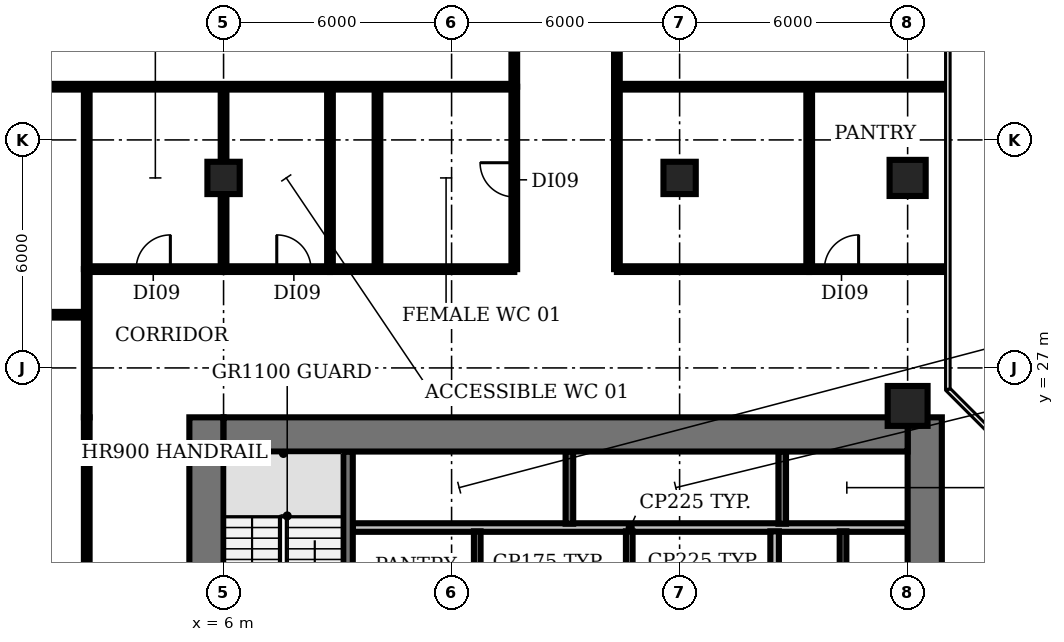
"""IFC4 building model, lengths in metres.
Left out: names, types, materials, properties, quantities, classifications, styles, units other than length and angle.
Written with IfcOpenShell. Run it as: python <this file> out.ifc"""

import sys

from ifc_helpers import new_model, si_unit, direction, frame, frame_2d, origin, origin_2d, place, context, subcontext, project, spatial, rectangle, circle, extrude, element, fill, save


model = new_model("IFC4")
c1 = context("Model", 3, precision=1e-05, world=origin(), true_north=direction((0.0, 1.0)))
c2 = subcontext(c1, "Body", "Model", "MODEL_VIEW")
j1 = project(units=[si_unit("LENGTHUNIT", "METRE"), si_unit("PLANEANGLEUNIT", "RADIAN")], contexts=[c1])
p1 = place(None, origin())
s1 = spatial("IfcSite", under=j1, at=p1, CompositionType="ELEMENT")
p2 = place(p1, origin())
s2 = spatial("IfcBuilding", under=s1, at=p2, CompositionType="ELEMENT")
p3 = place(p2, frame((0.0, 0.0, 58.4)))
s3 = spatial("IfcBuildingStorey", under=s2, at=p3, CompositionType="ELEMENT", Elevation=58.4)
for number, where, z_axis, x_axis in (
    (1, (6.0, 32.0, 0.0), (0.0, 0.0, 1.0), (1.0, 0.0, 0.0)),
    (2, (18.0, 32.0, 0.0), (0.0, 0.0, 1.0), (1.0, 0.0, 0.0)),
):
    element("IfcColumn", number, at=place(p3, frame(where, z_axis=z_axis, x_axis=x_axis)), inside=s3, PredefinedType="COLUMN", context=c2, shape_type="SweptSolid", body=[
        extrude(rectangle(XDim=0.85, YDim=0.85, at=origin_2d()), origin(), (0.0, 0.0, 1.0), 3.85),
    ])
p4 = place(p3, frame((24.0, 26.0, 0.0), z_axis=(0.0, 0.0, 1.0), x_axis=(1.0, 0.0, 0.0)))
e3 = element("IfcColumn", 3, at=p4, inside=s3, PredefinedType="COLUMN", context=c2, shape_type="SweptSolid", body=[
    extrude(circle(Radius=0.525, at=origin_2d()), origin(), (0.0, 0.0, 1.0), 3.85),
])
p5 = place(p3, frame((24.0, 32.0, 0.0), z_axis=(0.0, 0.0, 1.0), x_axis=(1.0, 0.0, 0.0)))
e4 = element("IfcColumn", 4, at=p5, inside=s3, PredefinedType="COLUMN", context=c2, shape_type="SweptSolid", body=[
    extrude(rectangle(XDim=0.95, YDim=0.95, at=origin_2d()), origin(), (0.0, 0.0, 1.0), 3.85),
])
p6 = place(p3, frame((9.4, 22.8, 0.0), z_axis=(0.0, 0.0, 1.0), x_axis=(1.0, 0.0, 0.0)))
e5 = element("IfcWall", 5, at=p6, inside=s3, PredefinedType="PARTITIONING", context=c2, shape_type="SweptSolid", body=[
    extrude(rectangle(XDim=14.6, YDim=0.225, at=frame_2d((7.3, 0.0))), origin(), (0.0, 0.0, 1.0), 3.85),
])
p7 = place(p3, frame((9.275, 18.375, 0.0), z_axis=(0.0, 0.0, 1.0), x_axis=(0.0, 1.0, 0.0)))
e6 = element("IfcWall", 6, at=p7, inside=s3, PredefinedType="SHEAR", context=c2, shape_type="SweptSolid", body=[
    extrude(rectangle(XDim=6.425, YDim=0.25, at=frame_2d((3.212, 0.0))), origin(), (0.0, 0.0, 1.0), 3.85),
])
p8 = place(p3, frame((12.675, 20.1, 0.0), z_axis=(0.0, 0.0, 1.0), x_axis=(0.0, 1.0, 0.0)))
e7 = element("IfcWall", 7, at=p8, inside=s3, PredefinedType="PARTITIONING", context=c2, shape_type="SweptSolid", body=[
    extrude(rectangle(XDim=2.6, YDim=0.175, at=frame_2d((1.3, 0.0))), origin(), (0.0, 0.0, 1.0), 3.85),
])
p9 = place(p3, frame((15.1, 22.9, 0.0), z_axis=(0.0, 0.0, 1.0), x_axis=(0.0, 1.0, 0.0)))
e8 = element("IfcWall", 8, at=p9, inside=s3, PredefinedType="SHEAR", context=c2, shape_type="SweptSolid", body=[
    extrude(rectangle(XDim=1.9, YDim=0.2, at=frame_2d((0.95, 0.0))), origin(), (0.0, 0.0, 1.0), 3.85),
])
p10 = place(p3, frame((16.675, 20.1, 0.0), z_axis=(0.0, 0.0, 1.0), x_axis=(0.0, 1.0, 0.0)))
e9 = element("IfcWall", 9, at=p10, inside=s3, PredefinedType="PARTITIONING", context=c2, shape_type="SweptSolid", body=[
    extrude(rectangle(XDim=2.6, YDim=0.175, at=frame_2d((1.3, 0.0))), origin(), (0.0, 0.0, 1.0), 3.85),
])
p11 = place(p3, frame((20.5, 20.1, 0.0), z_axis=(0.0, 0.0, 1.0), x_axis=(0.0, 1.0, 0.0)))
e10 = element("IfcWall", 10, at=p11, inside=s3, PredefinedType="PARTITIONING", context=c2, shape_type="SweptSolid", body=[
    extrude(rectangle(XDim=2.6, YDim=0.225, at=frame_2d((1.3, 0.0))), origin(), (0.0, 0.0, 1.0), 3.85),
])
p12 = place(p3, frame((20.7, 22.9, 0.0), z_axis=(0.0, 0.0, 1.0), x_axis=(0.0, 1.0, 0.0)))
e11 = element("IfcWall", 11, at=p12, inside=s3, PredefinedType="SHEAR", context=c2, shape_type="SweptSolid", body=[
    extrude(rectangle(XDim=1.9, YDim=0.2, at=frame_2d((0.95, 0.0))), origin(), (0.0, 0.0, 1.0), 3.85),
])
p13 = place(p3, frame((22.3, 20.1, 0.0), z_axis=(0.0, 0.0, 1.0), x_axis=(0.0, 1.0, 0.0)))
e12 = element("IfcWall", 12, at=p13, inside=s3, PredefinedType="PARTITIONING", context=c2, shape_type="SweptSolid", body=[
    extrude(rectangle(XDim=2.6, YDim=0.175, at=frame_2d((1.3, 0.0))), origin(), (0.0, 0.0, 1.0), 3.85),
])
p14 = place(p3, frame((5.55, 4.5, 0.0), z_axis=(0.0, 0.0, 1.0), x_axis=(0.0, 1.0, 0.0)))
e13 = element("IfcWall", 13, at=p14, inside=s3, PredefinedType="SHEAR", context=c2, shape_type="SweptSolid", body=[
    extrude(rectangle(XDim=21.2, YDim=0.9, at=frame_2d((10.6, 0.0))), origin(), (0.0, 0.0, 1.0), 3.85),
])
p15 = place(p14, frame((1.15, 0.0, 0.0)))
e14 = element("IfcOpeningElement", 14, at=p15, cuts=e13, PredefinedType="OPENING", context=c2, shape_type="SweptSolid", body=[
    extrude(rectangle(XDim=1.5, YDim=2.1, at=frame_2d((0.75, 1.05))), frame((0.0, 0.46, 0.0), z_axis=(0.0, -1.0, 0.0), x_axis=(1.0, 0.0, 0.0)), (0.0, 0.0, 1.0), 0.92),
])
p16 = place(p14, frame((7.6, 0.0, 0.0)))
e15 = element("IfcOpeningElement", 15, at=p16, cuts=e13, PredefinedType="OPENING", context=c2, shape_type="SweptSolid", body=[
    extrude(rectangle(XDim=1.2, YDim=2.1, at=frame_2d((0.6, 1.05))), frame((0.0, 0.46, 0.0), z_axis=(0.0, -1.0, 0.0), x_axis=(1.0, 0.0, 0.0)), (0.0, 0.0, 1.0), 0.92),
])
p17 = place(p14, frame((14.15, 0.0, 0.0)))
e16 = element("IfcOpeningElement", 16, at=p17, cuts=e13, PredefinedType="OPENING", context=c2, shape_type="SweptSolid", body=[
    extrude(rectangle(XDim=1.2, YDim=2.1, at=frame_2d((0.6, 1.05))), frame((0.0, 0.46, 0.0), z_axis=(0.0, -1.0, 0.0), x_axis=(1.0, 0.0, 0.0)), (0.0, 0.0, 1.0), 0.92),
])
p18 = place(p3, frame((24.45, 25.7, 0.0), z_axis=(0.0, 0.0, 1.0), x_axis=(0.0, -1.0, 0.0)))
e17 = element("IfcWall", 17, at=p18, inside=s3, PredefinedType="SHEAR", context=c2, shape_type="SweptSolid", body=[
    extrude(rectangle(XDim=21.2, YDim=0.9, at=frame_2d((10.6, 0.0))), origin(), (0.0, 0.0, 1.0), 3.85),
])
p19 = place(p18, frame((18.55, 0.0, 0.0)))
e18 = element("IfcOpeningElement", 18, at=p19, cuts=e17, PredefinedType="OPENING", context=c2, shape_type="SweptSolid", body=[
    extrude(rectangle(XDim=1.5, YDim=2.1, at=frame_2d((0.75, 1.05))), frame((0.0, 0.46, 0.0), z_axis=(0.0, -1.0, 0.0), x_axis=(1.0, 0.0, 0.0)), (0.0, 0.0, 1.0), 0.92),
])
p20 = place(p18, frame((12.45, 0.0, 0.0)))
e19 = element("IfcOpeningElement", 19, at=p20, cuts=e17, PredefinedType="OPENING", context=c2, shape_type="SweptSolid", body=[
    extrude(rectangle(XDim=0.9, YDim=2.1, at=frame_2d((0.45, 1.05))), frame((0.0, 0.46, 0.0), z_axis=(0.0, -1.0, 0.0), x_axis=(1.0, 0.0, 0.0)), (0.0, 0.0, 1.0), 0.92),
])
p21 = place(p18, frame((6.45, 0.0, 0.0)))
e20 = element("IfcOpeningElement", 20, at=p21, cuts=e17, PredefinedType="OPENING", context=c2, shape_type="SweptSolid", body=[
    extrude(rectangle(XDim=2.0, YDim=2.1, at=frame_2d((1.0, 1.05))), frame((0.0, 0.46, 0.0), z_axis=(0.0, -1.0, 0.0), x_axis=(1.0, 0.0, 0.0)), (0.0, 0.0, 1.0), 0.92),
])
p22 = place(p3, frame((6.0, 25.25, 0.0), z_axis=(0.0, 0.0, 1.0), x_axis=(1.0, 0.0, 0.0)))
e21 = element("IfcWall", 21, at=p22, inside=s3, PredefinedType="SHEAR", context=c2, shape_type="SweptSolid", body=[
    extrude(rectangle(XDim=18.0, YDim=0.9, at=frame_2d((9.0, 0.0))), origin(), (0.0, 0.0, 1.0), 3.85),
])
p23 = place(p3, frame((-1.28, 34.4, 0.0), z_axis=(0.0, 0.0, 1.0), x_axis=(1.0, 0.0, 0.0)))
e22 = element("IfcWall", 22, at=p23, inside=s3, PredefinedType="PARTITIONING", context=c2, shape_type="SweptSolid", body=[
    extrude(rectangle(XDim=14.93, YDim=0.15, at=frame_2d((7.465, 0.0))), origin(), (0.0, 0.0, 1.0), 2.83),
])
p24 = place(p3, frame((-0.998, 28.4, 0.0), z_axis=(0.0, 0.0, 1.0), x_axis=(1.0, 0.0, 0.0)))
e23 = element("IfcWall", 23, at=p24, inside=s3, PredefinedType="PARTITIONING", context=c2, shape_type="SweptSolid", body=[
    extrude(rectangle(XDim=3.398, YDim=0.15, at=frame_2d((1.699, 0.0))), origin(), (0.0, 0.0, 1.0), 2.83),
])
p25 = place(p3, frame((2.4, 4.5, 0.0), z_axis=(0.0, 0.0, 1.0), x_axis=(0.0, 1.0, 0.0)))
e24 = element("IfcWall", 24, at=p25, inside=s3, PredefinedType="PARTITIONING", context=c2, shape_type="SweptSolid", body=[
    extrude(rectangle(XDim=21.2, YDim=0.15, at=frame_2d((10.6, 0.0))), origin(), (0.0, 0.0, 1.0), 2.83),
])
p26 = place(p25, frame((10.8, 0.0, 0.0)))
e25 = element("IfcOpeningElement", 25, at=p26, cuts=e24, PredefinedType="OPENING", context=c2, shape_type="SweptSolid", body=[
    extrude(rectangle(XDim=1.2, YDim=2.1, at=frame_2d((0.6, 1.05))), frame((0.0, 0.085, 0.0), z_axis=(0.0, -1.0, 0.0), x_axis=(1.0, 0.0, 0.0)), (0.0, 0.0, 1.0), 0.17),
])
p27 = place(p3, frame((2.4, 25.7, 0.0), z_axis=(0.0, 0.0, 1.0), x_axis=(0.0, 1.0, 0.0)))
e26 = element("IfcWall", 26, at=p27, inside=s3, PredefinedType="PARTITIONING", context=c2, shape_type="SweptSolid", body=[
    extrude(rectangle(XDim=3.9, YDim=0.15, at=frame_2d((1.95, 0.0))), origin(), (0.0, 0.0, 1.0), 2.83),
])
p28 = place(p3, frame((2.4, 29.6, 0.0), z_axis=(0.0, 0.0, 1.0), x_axis=(0.0, 1.0, 0.0)))
e27 = element("IfcWall", 27, at=p28, inside=s3, PredefinedType="PARTITIONING", context=c2, shape_type="SweptSolid", body=[
    extrude(rectangle(XDim=4.8, YDim=0.15, at=frame_2d((2.4, 0.0))), origin(), (0.0, 0.0, 1.0), 2.83),
])
p29 = place(p3, frame((2.4, 29.6, 0.0), z_axis=(0.0, 0.0, 1.0), x_axis=(1.0, 0.0, 0.0)))
e28 = element("IfcWall", 28, at=p29, inside=s3, PredefinedType="PARTITIONING", context=c2, shape_type="SweptSolid", body=[
    extrude(rectangle(XDim=3.6, YDim=0.15, at=frame_2d((1.8, 0.0))), origin(), (0.0, 0.0, 1.0), 2.83),
])
p30 = place(p29, frame((1.3, 0.0, 0.0)))
e29 = element("IfcOpeningElement", 29, at=p30, cuts=e28, PredefinedType="OPENING", context=c2, shape_type="SweptSolid", body=[
    extrude(rectangle(XDim=0.9, YDim=2.1, at=frame_2d((0.45, 1.05))), frame((0.0, 0.085, 0.0), z_axis=(0.0, -1.0, 0.0), x_axis=(1.0, 0.0, 0.0)), (0.0, 0.0, 1.0), 0.17),
])
p31 = place(p3, frame((6.0, 29.6, 0.0), z_axis=(0.0, 0.0, 1.0), x_axis=(0.0, 1.0, 0.0)))
e30 = element("IfcWall", 30, at=p31, inside=s3, PredefinedType="PARTITIONING", context=c2, shape_type="SweptSolid", body=[
    extrude(rectangle(XDim=4.8, YDim=0.15, at=frame_2d((2.4, 0.0))), origin(), (0.0, 0.0, 1.0), 2.83),
])
p32 = place(p3, frame((6.0, 29.6, 0.0), z_axis=(0.0, 0.0, 1.0), x_axis=(1.0, 0.0, 0.0)))
e31 = element("IfcWall", 31, at=p32, inside=s3, PredefinedType="PARTITIONING", context=c2, shape_type="SweptSolid", body=[
    extrude(rectangle(XDim=2.8, YDim=0.15, at=frame_2d((1.4, 0.0))), origin(), (0.0, 0.0, 1.0), 2.83),
])
p33 = place(p32, frame((1.4, 0.0, 0.0)))
e32 = element("IfcOpeningElement", 32, at=p33, cuts=e31, PredefinedType="OPENING", context=c2, shape_type="SweptSolid", body=[
    extrude(rectangle(XDim=0.9, YDim=2.1, at=frame_2d((0.45, 1.05))), frame((0.0, 0.085, 0.0), z_axis=(0.0, -1.0, 0.0), x_axis=(1.0, 0.0, 0.0)), (0.0, 0.0, 1.0), 0.17),
])
p34 = place(p3, frame((8.8, 29.6, 0.0), z_axis=(0.0, 0.0, 1.0), x_axis=(0.0, 1.0, 0.0)))
e33 = element("IfcWall", 33, at=p34, inside=s3, PredefinedType="PARTITIONING", context=c2, shape_type="SweptSolid", body=[
    extrude(rectangle(XDim=4.8, YDim=0.15, at=frame_2d((2.4, 0.0))), origin(), (0.0, 0.0, 1.0), 2.83),
])
p35 = place(p3, frame((8.8, 29.6, 0.0), z_axis=(0.0, 0.0, 1.0), x_axis=(1.0, 0.0, 0.0)))
e34 = element("IfcWall", 34, at=p35, inside=s3, PredefinedType="PARTITIONING", context=c2, shape_type="SweptSolid", body=[
    extrude(rectangle(XDim=4.85, YDim=0.15, at=frame_2d((2.425, 0.0))), origin(), (0.0, 0.0, 1.0), 2.83),
])
p36 = place(p3, frame((10.05, 29.6, 0.0), z_axis=(0.0, 0.0, 1.0), x_axis=(0.0, 1.0, 0.0)))
e35 = element("IfcWall", 35, at=p36, inside=s3, PredefinedType="PARTITIONING", context=c2, shape_type="SweptSolid", body=[
    extrude(rectangle(XDim=4.8, YDim=0.15, at=frame_2d((2.4, 0.0))), origin(), (0.0, 0.0, 1.0), 2.83),
])
p37 = place(p3, frame((13.65, 29.6, 0.0), z_axis=(0.0, 0.0, 1.0), x_axis=(0.0, 1.0, 0.0)))
e36 = element("IfcWall", 36, at=p37, inside=s3, PredefinedType="PARTITIONING", context=c2, shape_type="SweptSolid", body=[
    extrude(rectangle(XDim=4.8, YDim=0.15, at=frame_2d((2.4, 0.0))), origin(), (0.0, 0.0, 1.0), 2.83),
])
p38 = place(p37, frame((1.9, 0.0, 0.0)))
e37 = element("IfcOpeningElement", 37, at=p38, cuts=e36, PredefinedType="OPENING", context=c2, shape_type="SweptSolid", body=[
    extrude(rectangle(XDim=0.9, YDim=2.1, at=frame_2d((0.45, 1.05))), frame((0.0, 0.085, 0.0), z_axis=(0.0, -1.0, 0.0), x_axis=(1.0, 0.0, 0.0)), (0.0, 0.0, 1.0), 0.17),
])
p39 = place(p3, frame((13.65, 34.4, 0.0), z_axis=(0.0, 0.0, 1.0), x_axis=(0.0, 1.0, 0.0)))
e38 = element("IfcWall", 38, at=p39, inside=s3, PredefinedType="PARTITIONING", context=c2, shape_type="SweptSolid", body=[
    extrude(rectangle(XDim=4.6, YDim=0.15, at=frame_2d((2.3, 0.0))), origin(), (0.0, 0.0, 1.0), 2.83),
])
p40 = place(p39, frame((1.9, 0.0, 0.0)))
e39 = element("IfcOpeningElement", 39, at=p40, cuts=e38, PredefinedType="OPENING", context=c2, shape_type="SweptSolid", body=[
    extrude(rectangle(XDim=1.0, YDim=2.1, at=frame_2d((0.5, 1.05))), frame((0.0, 0.085, 0.0), z_axis=(0.0, -1.0, 0.0), x_axis=(1.0, 0.0, 0.0)), (0.0, 0.0, 1.0), 0.17),
])
p41 = place(p3, frame((16.35, 29.6, 0.0), z_axis=(0.0, 0.0, 1.0), x_axis=(0.0, 1.0, 0.0)))
e40 = element("IfcWall", 40, at=p41, inside=s3, PredefinedType="PARTITIONING", context=c2, shape_type="SweptSolid", body=[
    extrude(rectangle(XDim=4.8, YDim=0.15, at=frame_2d((2.4, 0.0))), origin(), (0.0, 0.0, 1.0), 2.83),
])
p42 = place(p3, frame((16.35, 29.6, 0.0), z_axis=(0.0, 0.0, 1.0), x_axis=(1.0, 0.0, 0.0)))
e41 = element("IfcWall", 41, at=p42, inside=s3, PredefinedType="PARTITIONING", context=c2, shape_type="SweptSolid", body=[
    extrude(rectangle(XDim=5.06, YDim=0.15, at=frame_2d((2.53, 0.0))), origin(), (0.0, 0.0, 1.0), 2.83),
])
p43 = place(p3, frame((16.35, 34.4, 0.0), z_axis=(0.0, 0.0, 1.0), x_axis=(1.0, 0.0, 0.0)))
e42 = element("IfcWall", 42, at=p43, inside=s3, PredefinedType="PARTITIONING", context=c2, shape_type="SweptSolid", body=[
    extrude(rectangle(XDim=8.66, YDim=0.15, at=frame_2d((4.33, 0.0))), origin(), (0.0, 0.0, 1.0), 2.83),
])
p44 = place(p3, frame((16.35, 45.0, 0.0), z_axis=(0.0, 0.0, 1.0), x_axis=(0.0, -1.0, 0.0)))
e43 = element("IfcWall", 43, at=p44, inside=s3, PredefinedType="PARTITIONING", context=c2, shape_type="SweptSolid", body=[
    extrude(rectangle(XDim=10.6, YDim=0.15, at=frame_2d((5.3, 0.0))), origin(), (0.0, 0.0, 1.0), 2.83),
])
p45 = place(p44, frame((4.7, 0.0, 0.0)))
e44 = element("IfcOpeningElement", 44, at=p45, cuts=e43, PredefinedType="OPENING", context=c2, shape_type="SweptSolid", body=[
    extrude(rectangle(XDim=1.2, YDim=2.1, at=frame_2d((0.6, 1.05))), frame((0.0, 0.085, 0.0), z_axis=(0.0, -1.0, 0.0), x_axis=(1.0, 0.0, 0.0)), (0.0, 0.0, 1.0), 0.17),
])
p46 = place(p3, frame((21.41, 29.6, 0.0), z_axis=(0.0, 0.0, 1.0), x_axis=(0.0, 1.0, 0.0)))
e45 = element("IfcWall", 45, at=p46, inside=s3, PredefinedType="PARTITIONING", context=c2, shape_type="SweptSolid", body=[
    extrude(rectangle(XDim=4.8, YDim=0.15, at=frame_2d((2.4, 0.0))), origin(), (0.0, 0.0, 1.0), 2.83),
])
p47 = place(p3, frame((21.41, 29.6, 0.0), z_axis=(0.0, 0.0, 1.0), x_axis=(1.0, 0.0, 0.0)))
e46 = element("IfcWall", 46, at=p47, inside=s3, PredefinedType="PARTITIONING", context=c2, shape_type="SweptSolid", body=[
    extrude(rectangle(XDim=3.6, YDim=0.15, at=frame_2d((1.8, 0.0))), origin(), (0.0, 0.0, 1.0), 2.83),
])
p48 = place(p47, frame((0.4, 0.0, 0.0)))
e47 = element("IfcOpeningElement", 47, at=p48, cuts=e46, PredefinedType="OPENING", context=c2, shape_type="SweptSolid", body=[
    extrude(rectangle(XDim=0.9, YDim=2.1, at=frame_2d((0.45, 1.05))), frame((0.0, 0.085, 0.0), z_axis=(0.0, -1.0, 0.0), x_axis=(1.0, 0.0, 0.0)), (0.0, 0.0, 1.0), 0.17),
])
p49 = place(p30, origin())
e48 = element("IfcDoor", 48, at=p49, inside=s3, OperationType="SINGLE_SWING_RIGHT", PredefinedType="DOOR", context=c2, shape_type="SweptSolid", body=[
    extrude(rectangle(XDim=0.9, YDim=2.1, at=frame_2d((0.45, 1.05))), frame((0.0, 0.025, 0.0), z_axis=(0.0, -1.0, 0.0), x_axis=(1.0, 0.0, 0.0)), (0.0, 0.0, 1.0), 0.05),
])
fill(e29, e48)
p50 = place(p33, origin())
e49 = element("IfcDoor", 49, at=p50, inside=s3, OperationType="SINGLE_SWING_LEFT", PredefinedType="DOOR", context=c2, shape_type="SweptSolid", body=[
    extrude(rectangle(XDim=0.9, YDim=2.1, at=frame_2d((0.45, 1.05))), frame((0.0, 0.025, 0.0), z_axis=(0.0, -1.0, 0.0), x_axis=(1.0, 0.0, 0.0)), (0.0, 0.0, 1.0), 0.05),
])
fill(e32, e49)
p51 = place(p38, origin())
e50 = element("IfcDoor", 50, at=p51, inside=s3, OperationType="SINGLE_SWING_RIGHT", PredefinedType="DOOR", context=c2, shape_type="SweptSolid", body=[
    extrude(rectangle(XDim=0.9, YDim=2.1, at=frame_2d((0.45, 1.05))), frame((0.0, 0.025, 0.0), z_axis=(0.0, -1.0, 0.0), x_axis=(1.0, 0.0, 0.0)), (0.0, 0.0, 1.0), 0.05),
])
fill(e37, e50)
p52 = place(p48, origin())
e51 = element("IfcDoor", 51, at=p52, inside=s3, OperationType="SINGLE_SWING_RIGHT", PredefinedType="DOOR", context=c2, shape_type="SweptSolid", body=[
    extrude(rectangle(XDim=0.9, YDim=2.1, at=frame_2d((0.45, 1.05))), frame((0.0, 0.025, 0.0), z_axis=(0.0, -1.0, 0.0), x_axis=(1.0, 0.0, 0.0)), (0.0, 0.0, 1.0), 0.05),
])
fill(e47, e51)
save(model, sys.argv[1])
